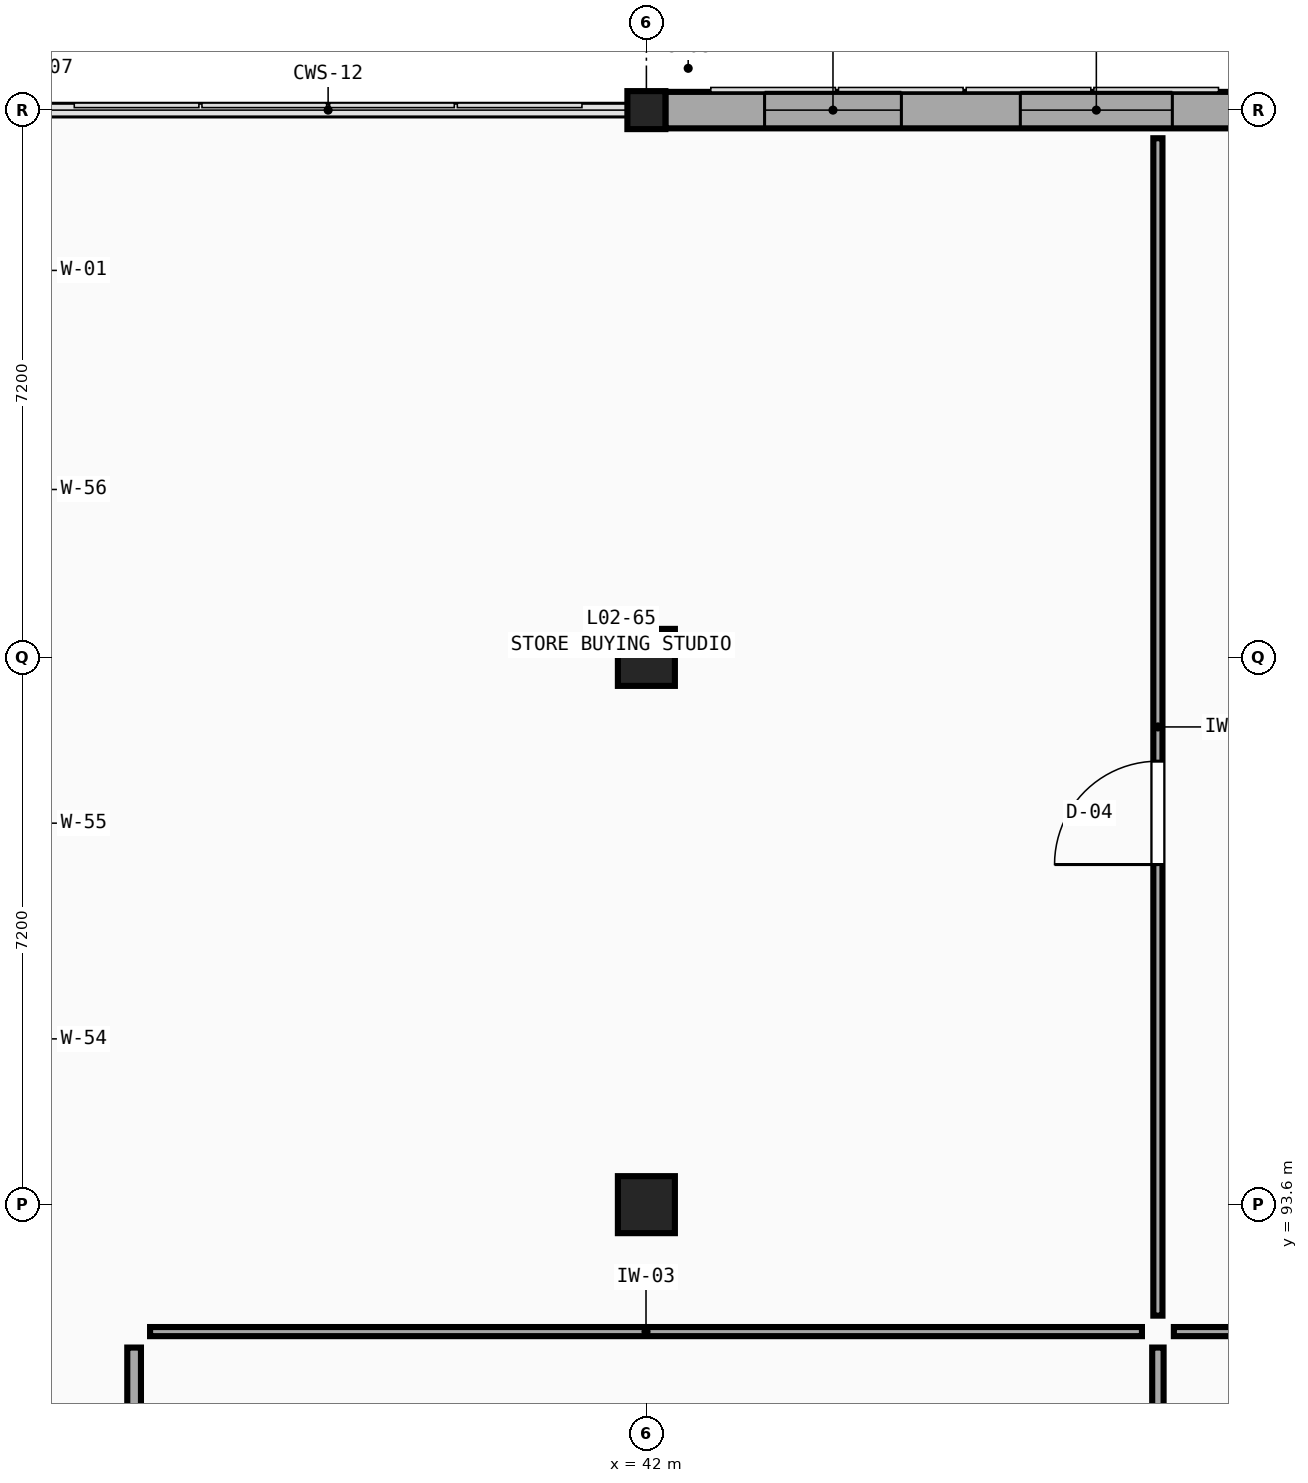
"""IFC4 building model, lengths in metres.
Left out: names, types, materials, properties, quantities, classifications, styles, units other than length and angle.
Written with IfcOpenShell. Run it as: python <this file> out.ifc"""

import sys

from ifc_helpers import new_model, si_unit, direction, frame, frame_2d, origin, origin_2d, place, context, subcontext, project, spatial, rectangle, extrude, element, fill, save


model = new_model("IFC4")
c1 = context("Model", 3, precision=1e-05, world=origin(), true_north=direction((0.0, 1.0)))
c2 = subcontext(c1, "Body", "Model", "MODEL_VIEW")
j1 = project(units=[si_unit("LENGTHUNIT", "METRE"), si_unit("PLANEANGLEUNIT", "RADIAN")], contexts=[c1])
p1 = place(None, origin())
s1 = spatial("IfcSite", under=j1, at=p1, CompositionType="ELEMENT")
p2 = place(p1, origin())
s2 = spatial("IfcBuilding", under=s1, at=p2, CompositionType="ELEMENT")
p3 = place(p2, frame((0.0, 0.0, 9.9)))
s3 = spatial("IfcBuildingStorey", under=s2, at=p3, CompositionType="ELEMENT", Elevation=9.9)
for number, where, z_axis, x_axis in (
    (1, (42.0, 93.6, 0.0), (0.0, 0.0, 1.0), (1.0, 0.0, 0.0)),
    (2, (42.0, 100.8, 0.0), (0.0, 0.0, 1.0), (1.0, 0.0, 0.0)),
):
    element("IfcColumn", number, at=place(p3, frame(where, z_axis=z_axis, x_axis=x_axis)), inside=s3, PredefinedType="COLUMN", context=c2, shape_type="SweptSolid", body=[
        extrude(rectangle(XDim=0.75, YDim=0.75, at=origin_2d()), origin(), (0.0, 0.0, 1.0), 4.5),
    ])
p4 = place(p3, frame((42.0, 108.0, 0.0), z_axis=(0.0, 0.0, 1.0), x_axis=(1.0, 0.0, 0.0)))
e3 = element("IfcColumn", 3, at=p4, inside=s3, PredefinedType="COLUMN", context=c2, shape_type="SweptSolid", body=[
    extrude(rectangle(XDim=0.5, YDim=0.5, at=origin_2d()), origin(), (0.0, 0.0, 1.0), 4.5),
])
p5 = place(p3, frame((42.25, 108.0, 0.0), z_axis=(0.0, 0.0, 1.0), x_axis=(1.0, 0.0, 0.0)))
e4 = element("IfcWall", 4, at=p5, inside=s3, PredefinedType="SOLIDWALL", context=c2, shape_type="SweptSolid", body=[
    extrude(rectangle(XDim=7.875, YDim=0.48, at=frame_2d((3.938, 0.0))), origin(), (0.0, 0.0, 1.0), 3.63),
])
p6 = place(p5, frame((1.305, 0.0, 0.75)))
e5 = element("IfcOpeningElement", 5, at=p6, cuts=e4, PredefinedType="OPENING", context=c2, shape_type="SweptSolid", body=[
    extrude(rectangle(XDim=1.8, YDim=1.9, at=frame_2d((0.9, 0.95))), frame((0.0, 0.26, 0.0), z_axis=(0.0, -1.0, 0.0), x_axis=(1.0, 0.0, 0.0)), (0.0, 0.0, 1.0), 0.52),
])
p7 = place(p5, frame((4.67, 0.0, 0.75)))
e6 = element("IfcOpeningElement", 6, at=p7, cuts=e4, PredefinedType="OPENING", context=c2, shape_type="SweptSolid", body=[
    extrude(rectangle(XDim=2.0, YDim=1.9, at=frame_2d((1.0, 0.95))), frame((0.0, 0.26, 0.0), z_axis=(0.0, -1.0, 0.0), x_axis=(1.0, 0.0, 0.0)), (0.0, 0.0, 1.0), 0.52),
])
p8 = place(p3, frame((48.94, 91.93, 0.0), z_axis=(0.0, 0.0, 1.0), x_axis=(1.0, 0.0, 0.0)))
e7 = element("IfcWall", 7, at=p8, inside=s3, PredefinedType="PARTITIONING", context=c2, shape_type="SweptSolid", body=[
    extrude(rectangle(XDim=19.88, YDim=0.12, at=frame_2d((9.94, 0.0))), origin(), (0.0, 0.0, 1.0), 4.18),
])
p9 = place(p8, frame((7.98, 0.0, 0.0)))
e8 = element("IfcOpeningElement", 8, at=p9, cuts=e7, PredefinedType="OPENING", context=c2, shape_type="SweptSolid", body=[
    extrude(rectangle(XDim=0.88, YDim=2.05, at=frame_2d((0.44, 1.025))), frame((0.0, 0.08, 0.0), z_axis=(0.0, -1.0, 0.0), x_axis=(1.0, 0.0, 0.0)), (0.0, 0.0, 1.0), 0.16),
])
p10 = place(p3, frame((35.26, 75.633, 0.0), z_axis=(0.0, 0.0, 1.0), x_axis=(0.0, 1.0, 0.0)))
e9 = element("IfcWall", 9, at=p10, inside=s3, PredefinedType="PARTITIONING", context=c2, shape_type="SweptSolid", body=[
    extrude(rectangle(XDim=16.087, YDim=0.18, at=frame_2d((8.043, 0.0))), origin(), (0.0, 0.0, 1.0), 4.18),
])
p11 = place(p3, frame((48.73, 75.633, 0.0), z_axis=(0.0, 0.0, 1.0), x_axis=(0.0, 1.0, 0.0)))
e10 = element("IfcWall", 10, at=p11, inside=s3, PredefinedType="PARTITIONING", context=c2, shape_type="SweptSolid", body=[
    extrude(rectangle(XDim=16.087, YDim=0.15, at=frame_2d((8.043, 0.0))), origin(), (0.0, 0.0, 1.0), 4.18),
])
p12 = place(p3, frame((48.73, 92.14, 0.0), z_axis=(0.0, 0.0, 1.0), x_axis=(0.0, 1.0, 0.0)))
e11 = element("IfcWall", 11, at=p12, inside=s3, PredefinedType="PARTITIONING", context=c2, shape_type="SweptSolid", body=[
    extrude(rectangle(XDim=15.49, YDim=0.12, at=frame_2d((7.745, 0.0))), origin(), (0.0, 0.0, 1.0), 4.18),
])
p13 = place(p12, frame((5.935, 0.0, 0.0)))
e12 = element("IfcOpeningElement", 12, at=p13, cuts=e11, PredefinedType="OPENING", context=c2, shape_type="SweptSolid", body=[
    extrude(rectangle(XDim=1.36, YDim=2.05, at=frame_2d((0.68, 1.025))), frame((0.0, 0.08, 0.0), z_axis=(0.0, -1.0, 0.0), x_axis=(1.0, 0.0, 0.0)), (0.0, 0.0, 1.0), 0.16),
])
p14 = place(p3, frame((35.47, 91.93, 0.0), z_axis=(0.0, 0.0, 1.0), x_axis=(1.0, 0.0, 0.0)))
e13 = element("IfcWall", 13, at=p14, inside=s3, PredefinedType="PARTITIONING", context=c2, shape_type="SweptSolid", body=[
    extrude(rectangle(XDim=13.05, YDim=0.12, at=frame_2d((6.525, 0.0))), origin(), (0.0, 0.0, 1.0), 4.18),
])
p15 = place(p6, origin())
e14 = element("IfcWindow", 14, at=p15, inside=s3, PartitioningType="DOUBLE_PANEL_VERTICAL", PredefinedType="WINDOW", context=c2, shape_type="SweptSolid", body=[
    extrude(rectangle(XDim=1.8, YDim=1.9, at=frame_2d((0.9, 0.95))), frame((0.0, 0.03, 0.0), z_axis=(0.0, -1.0, 0.0), x_axis=(1.0, 0.0, 0.0)), (0.0, 0.0, 1.0), 0.06),
])
fill(e5, e14)
p16 = place(p7, origin())
e15 = element("IfcWindow", 15, at=p16, inside=s3, PartitioningType="TRIPLE_PANEL_VERTICAL", PredefinedType="WINDOW", context=c2, shape_type="SweptSolid", body=[
    extrude(rectangle(XDim=2.0, YDim=1.9, at=frame_2d((1.0, 0.95))), frame((0.0, 0.03, 0.0), z_axis=(0.0, -1.0, 0.0), x_axis=(1.0, 0.0, 0.0)), (0.0, 0.0, 1.0), 0.06),
])
fill(e6, e15)
p17 = place(p13, origin())
e16 = element("IfcDoor", 16, at=p17, inside=s3, OperationType="SINGLE_SWING_LEFT", PredefinedType="DOOR", context=c2, shape_type="SweptSolid", body=[
    extrude(rectangle(XDim=1.36, YDim=2.05, at=frame_2d((0.68, 1.025))), frame((0.0, 0.025, 0.0), z_axis=(0.0, -1.0, 0.0), x_axis=(1.0, 0.0, 0.0)), (0.0, 0.0, 1.0), 0.05),
])
fill(e12, e16)
save(model, sys.argv[1])
